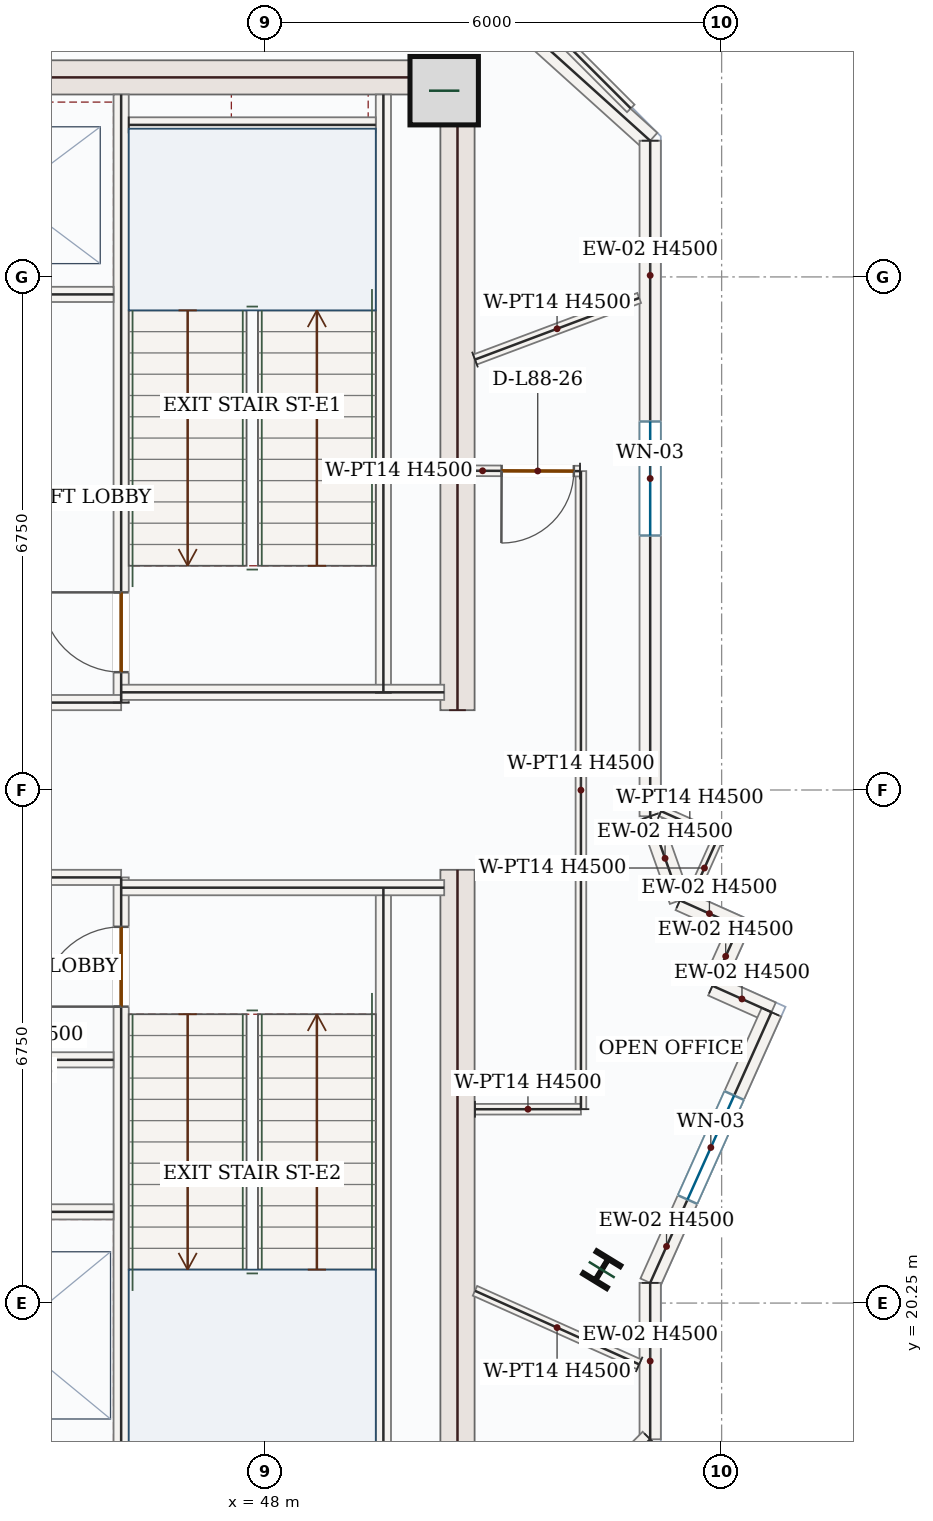
"""IFC4 building model, lengths in metres.
Left out: names, types, materials, properties, quantities, classifications, styles, units other than length and angle.
Written with IfcOpenShell. Run it as: python <this file> out.ifc"""

import sys

from ifc_helpers import new_model, si_unit, direction, frame, frame_2d, origin, origin_2d, place, context, subcontext, project, spatial, rectangle, i_section, extrude, source, transform, mapped, element, fill, save


model = new_model("IFC4")
c1 = context("Model", 3, precision=1e-05, world=origin(), true_north=direction((0.0, 1.0)))
c2 = subcontext(c1, "Body", "Model", "MODEL_VIEW")
j1 = project(units=[si_unit("LENGTHUNIT", "METRE"), si_unit("PLANEANGLEUNIT", "RADIAN")], contexts=[c1])
p1 = place(None, origin())
s1 = spatial("IfcSite", under=j1, at=p1, CompositionType="ELEMENT")
p2 = place(p1, origin())
s2 = spatial("IfcBuilding", under=s1, at=p2, CompositionType="ELEMENT")
p3 = place(p2, frame((0.0, 0.0, 361.05)))
s3 = spatial("IfcBuildingStorey", under=s2, at=p3, CompositionType="ELEMENT", Elevation=361.05)
m1 = source(origin(), c2, "Body", "SweptSolid", [
    extrude(rectangle(XDim=8.55, YDim=0.45, at=frame_2d((4.275, 0.0))), origin(), (0.0, 0.0, 1.0), 4.5),
])
for number, where, z_axis, x_axis in (
    (1, (50.525, 17.4, 0.0), (0.0, 0.0, 1.0), (0.0, 1.0, 0.0)),
    (2, (50.525, 28.05, 0.0), (0.0, 0.0, 1.0), (0.0, 1.0, 0.0)),
):
    element("IfcWall", number, at=place(p3, frame(where, z_axis=z_axis, x_axis=x_axis)), inside=s3, PredefinedType="SHEAR", context=c2, shape_type="MappedRepresentation", body=[
        mapped(m1, transform((0.0, 0.0, 0.0), x_axis=(1.0, 0.0, 0.0), y_axis=(0.0, 1.0, 0.0), z_axis=(0.0, 0.0, 1.0), scale=1.0)),
    ])
m2 = source(origin(), c2, "Body", "SweptSolid", [
    extrude(rectangle(XDim=7.1, YDim=0.45, at=frame_2d((3.55, 0.0))), origin(), (0.0, 0.0, 1.0), 4.5),
])
p4 = place(p3, frame((43.2, 36.375, 0.0), z_axis=(0.0, 0.0, 1.0), x_axis=(1.0, 0.0, 0.0)))
e3 = element("IfcWall", 3, at=p4, inside=s3, PredefinedType="SHEAR", context=c2, shape_type="MappedRepresentation", body=[
    mapped(m2, transform((0.0, 0.0, 0.0), x_axis=(1.0, 0.0, 0.0), y_axis=(0.0, 1.0, 0.0), z_axis=(0.0, 0.0, 1.0), scale=1.0)),
])
m3 = source(origin(), c2, "Body", "SweptSolid", [
    extrude(rectangle(XDim=0.9, YDim=0.9, at=origin_2d()), origin(), (0.0, 0.0, 1.0), 4.8),
])
p5 = place(p3, frame((50.35, 36.2, 0.0), z_axis=(0.0, 0.0, 1.0), x_axis=(1.0, 0.0, 0.0)))
e4 = element("IfcColumn", 4, at=p5, inside=s3, PredefinedType="COLUMN", context=c2, shape_type="MappedRepresentation", body=[
    mapped(m3, transform((0.0, 0.0, 0.0), x_axis=(1.0, 0.0, 0.0), y_axis=(0.0, 1.0, 0.0), z_axis=(0.0, 0.0, 1.0), scale=1.0)),
])
m4 = source(origin(), c2, "Body", "SweptSolid", [
    extrude(i_section(OverallWidth=0.369, OverallDepth=0.356, WebThickness=0.011, FlangeThickness=0.018, FilletRadius=0.018, at=origin_2d()), origin(), (0.0, 0.0, 1.0), 4.8),
])
p6 = place(p3, frame((52.423, 20.689, 0.0), z_axis=(0.0, 0.0, 1.0), x_axis=(-0.852640164354, 0.522498564716, 0.0)))
e5 = element("IfcColumn", 5, at=p6, inside=s3, PredefinedType="COLUMN", context=c2, shape_type="MappedRepresentation", body=[
    mapped(m4, transform((0.0, 0.0, 0.0), x_axis=(1.0, 0.0, 0.0), y_axis=(0.0, 1.0, 0.0), z_axis=(0.0, 0.0, 1.0), scale=1.0)),
])
m5 = source(origin(), c2, "Body", "SweptSolid", [
    extrude(rectangle(XDim=5.692, YDim=0.28, at=frame_2d((2.846, 0.0))), origin(), (0.0, 0.0, 1.0), 4.5),
])
p7 = place(p3, frame((48.832, 39.353, 0.0), z_axis=(0.0, 0.0, 1.0), x_axis=(0.742767121681, -0.669549850981, 0.0)))
e6 = element("IfcWall", 6, at=p7, inside=s3, PredefinedType="SOLIDWALL", context=c2, shape_type="MappedRepresentation", body=[
    mapped(m5, transform((0.0, 0.0, 0.0), x_axis=(1.0, 0.0, 0.0), y_axis=(0.0, 1.0, 0.0), z_axis=(0.0, 0.0, 1.0), scale=1.0)),
])
p8 = place(p3, frame((53.06, 35.542, 0.0), z_axis=(0.0, 0.0, 1.0), x_axis=(0.0, -1.0, 0.0)))
e7 = element("IfcWall", 7, at=p8, inside=s3, PredefinedType="SOLIDWALL", context=c2, shape_type="SweptSolid", body=[
    extrude(rectangle(XDim=8.887, YDim=0.28, at=frame_2d((4.444, 0.0))), origin(), (0.0, 0.0, 1.0), 4.5),
])
p9 = place(p8, frame((3.694, 0.0, 0.85)))
e8 = element("IfcOpeningElement", 8, at=p9, cuts=e7, PredefinedType="OPENING", context=c2, shape_type="SweptSolid", body=[
    extrude(rectangle(XDim=1.5, YDim=1.5, at=frame_2d((0.75, 0.75))), frame((0.0, 0.15, 0.0), z_axis=(0.0, -1.0, 0.0), x_axis=(1.0, 0.0, 0.0)), (0.0, 0.0, 1.0), 0.3),
])
m6 = source(origin(), c2, "Body", "SweptSolid", [
    extrude(rectangle(XDim=1.174, YDim=0.28, at=frame_2d((0.587, 0.0))), origin(), (0.0, 0.0, 1.0), 4.5),
])
p10 = place(p3, frame((53.06, 26.655, 0.0), z_axis=(0.0, 0.0, 1.0), x_axis=(0.333581493928, -0.942721266817, 0.0)))
e9 = element("IfcWall", 9, at=p10, inside=s3, PredefinedType="SOLIDWALL", context=c2, shape_type="MappedRepresentation", body=[
    mapped(m6, transform((0.0, 0.0, 0.0), x_axis=(1.0, 0.0, 0.0), y_axis=(0.0, 1.0, 0.0), z_axis=(0.0, 0.0, 1.0), scale=1.0)),
])
m7 = source(origin(), c2, "Body", "SweptSolid", [
    extrude(rectangle(XDim=0.85, YDim=0.28, at=frame_2d((0.425, 0.0))), origin(), (0.0, 0.0, 1.0), 4.5),
])
p11 = place(p3, frame((53.452, 25.548, 0.0), z_axis=(0.0, 0.0, 1.0), x_axis=(0.912527808644, -0.409014667771, 0.0)))
e10 = element("IfcWall", 10, at=p11, inside=s3, PredefinedType="SOLIDWALL", context=c2, shape_type="MappedRepresentation", body=[
    mapped(m7, transform((0.0, 0.0, 0.0), x_axis=(1.0, 0.0, 0.0), y_axis=(0.0, 1.0, 0.0), z_axis=(0.0, 0.0, 1.0), scale=1.0)),
])
m8 = source(origin(), c2, "Body", "SweptSolid", [
    extrude(rectangle(XDim=0.85, YDim=0.28, at=frame_2d((0.425, 0.0))), origin(), (0.0, 0.0, 1.0), 4.5),
])
for number, where, z_axis, x_axis in (
    (11, (54.227, 25.2, 0.0), (0.0, 0.0, 1.0), (-0.409, -0.913, 0.0)),
    (12, (53.88, 24.425, 0.0), (0.0, 0.0, 1.0), (0.913, -0.409, 0.0)),
):
    element("IfcWall", number, at=place(p3, frame(where, z_axis=z_axis, x_axis=x_axis)), inside=s3, PredefinedType="SOLIDWALL", context=c2, shape_type="MappedRepresentation", body=[
        mapped(m8, transform((0.0, 0.0, 0.0), x_axis=(1.0, 0.0, 0.0), y_axis=(0.0, 1.0, 0.0), z_axis=(0.0, 0.0, 1.0), scale=1.0)),
    ])
p12 = place(p3, frame((54.656, 24.077, 0.0), z_axis=(0.0, 0.0, 1.0), x_axis=(-0.408847516138, -0.912602711232, 0.0)))
e13 = element("IfcWall", 13, at=p12, inside=s3, PredefinedType="SOLIDWALL", context=c2, shape_type="SweptSolid", body=[
    extrude(rectangle(XDim=3.902, YDim=0.28, at=frame_2d((1.951, 0.0))), origin(), (0.0, 0.0, 1.0), 4.5),
])
p13 = place(p12, frame((1.201, 0.0, 0.85)))
e14 = element("IfcOpeningElement", 14, at=p13, cuts=e13, PredefinedType="OPENING", context=c2, shape_type="SweptSolid", body=[
    extrude(rectangle(XDim=1.5, YDim=1.5, at=frame_2d((0.75, 0.75))), frame((0.0, 0.15, 0.0), z_axis=(0.0, -1.0, 0.0), x_axis=(1.0, 0.0, 0.0)), (0.0, 0.0, 1.0), 0.3),
])
m9 = source(origin(), c2, "Body", "SweptSolid", [
    extrude(rectangle(XDim=2.058, YDim=0.28, at=frame_2d((1.029, 0.0))), origin(), (0.0, 0.0, 1.0), 4.5),
])
p14 = place(p3, frame((53.06, 20.516, 0.0), z_axis=(0.0, 0.0, 1.0), x_axis=(0.0, -1.0, 0.0)))
e15 = element("IfcWall", 15, at=p14, inside=s3, PredefinedType="SOLIDWALL", context=c2, shape_type="MappedRepresentation", body=[
    mapped(m9, transform((0.0, 0.0, 0.0), x_axis=(1.0, 0.0, 0.0), y_axis=(0.0, 1.0, 0.0), z_axis=(0.0, 0.0, 1.0), scale=1.0)),
])
m10 = source(origin(), c2, "Body", "SweptSolid", [
    extrude(rectangle(XDim=2.362, YDim=0.28, at=frame_2d((1.181, 0.0))), origin(), (0.0, 0.0, 1.0), 4.5),
])
p15 = place(p3, frame((53.06, 18.458, 0.0), z_axis=(0.0, 0.0, 1.0), x_axis=(-0.707106781187, -0.707106781187, 0.0)))
e16 = element("IfcWall", 16, at=p15, inside=s3, PredefinedType="SOLIDWALL", context=c2, shape_type="MappedRepresentation", body=[
    mapped(m10, transform((0.0, 0.0, 0.0), x_axis=(1.0, 0.0, 0.0), y_axis=(0.0, 1.0, 0.0), z_axis=(0.0, 0.0, 1.0), scale=1.0)),
])
m11 = source(origin(), c2, "Body", "SweptSolid", [
    extrude(rectangle(XDim=7.87, YDim=0.2, at=frame_2d((3.935, 0.0))), origin(), (0.0, 0.0, 1.0), 4.5),
])
for number, where, z_axis, x_axis in (
    (17, (49.55, 17.85, 0.0), (0.0, 0.0, 1.0), (0.0, 1.0, 0.0)),
    (18, (49.55, 28.28, 0.0), (0.0, 0.0, 1.0), (0.0, 1.0, 0.0)),
):
    element("IfcWall", number, at=place(p3, frame(where, z_axis=z_axis, x_axis=x_axis)), inside=s3, PredefinedType="SOLIDWALL", context=c2, shape_type="MappedRepresentation", body=[
        mapped(m11, transform((0.0, 0.0, 0.0), x_axis=(1.0, 0.0, 0.0), y_axis=(0.0, 1.0, 0.0), z_axis=(0.0, 0.0, 1.0), scale=1.0)),
    ])
p16 = place(p3, frame((46.1, 17.85, 0.0), z_axis=(0.0, 0.0, 1.0), x_axis=(0.0, 1.0, 0.0)))
e19 = element("IfcWall", 19, at=p16, inside=s3, PredefinedType="SOLIDWALL", context=c2, shape_type="SweptSolid", body=[
    extrude(rectangle(XDim=8.0, YDim=0.2, at=frame_2d((4.0, 0.0))), origin(), (0.0, 0.0, 1.0), 4.5),
])
p17 = place(p16, frame((6.3, 0.0, 0.0)))
e20 = element("IfcOpeningElement", 20, at=p17, cuts=e19, PredefinedType="OPENING", context=c2, shape_type="SweptSolid", body=[
    extrude(rectangle(XDim=1.05, YDim=2.15, at=frame_2d((0.525, 1.075))), frame((0.0, 0.11, 0.0), z_axis=(0.0, -1.0, 0.0), x_axis=(1.0, 0.0, 0.0)), (0.0, 0.0, 1.0), 0.22),
])
p18 = place(p3, frame((46.1, 28.15, 0.0), z_axis=(0.0, 0.0, 1.0), x_axis=(0.0, 1.0, 0.0)))
e21 = element("IfcWall", 21, at=p18, inside=s3, PredefinedType="SOLIDWALL", context=c2, shape_type="SweptSolid", body=[
    extrude(rectangle(XDim=8.0, YDim=0.2, at=frame_2d((4.0, 0.0))), origin(), (0.0, 0.0, 1.0), 4.5),
])
p19 = place(p18, frame((0.4, 0.0, 0.0)))
e22 = element("IfcOpeningElement", 22, at=p19, cuts=e21, PredefinedType="OPENING", context=c2, shape_type="SweptSolid", body=[
    extrude(rectangle(XDim=1.05, YDim=2.15, at=frame_2d((0.525, 1.075))), frame((0.0, 0.11, 0.0), z_axis=(0.0, -1.0, 0.0), x_axis=(1.0, 0.0, 0.0)), (0.0, 0.0, 1.0), 0.22),
])
m12 = source(origin(), c2, "Body", "SweptSolid", [
    extrude(rectangle(XDim=3.0, YDim=0.2, at=frame_2d((1.5, 0.0))), origin(), (0.0, 0.0, 1.0), 4.5),
])
p20 = place(p3, frame((43.1, 25.85, 0.0), z_axis=(0.0, 0.0, 1.0), x_axis=(1.0, 0.0, 0.0)))
e23 = element("IfcWall", 23, at=p20, inside=s3, PredefinedType="SOLIDWALL", context=c2, shape_type="MappedRepresentation", body=[
    mapped(m12, transform((0.0, 0.0, 0.0), x_axis=(1.0, 0.0, 0.0), y_axis=(0.0, 1.0, 0.0), z_axis=(0.0, 0.0, 1.0), scale=1.0)),
])
m13 = source(origin(), c2, "Body", "SweptSolid", [
    extrude(rectangle(XDim=4.25, YDim=0.2, at=frame_2d((2.125, 0.0))), origin(), (0.0, 0.0, 1.0), 4.5),
])
p21 = place(p3, frame((46.1, 25.715, 0.0), z_axis=(0.0, 0.0, 1.0), x_axis=(1.0, 0.0, 0.0)))
e24 = element("IfcWall", 24, at=p21, inside=s3, PredefinedType="SOLIDWALL", context=c2, shape_type="MappedRepresentation", body=[
    mapped(m13, transform((0.0, 0.0, 0.0), x_axis=(1.0, 0.0, 0.0), y_axis=(0.0, 1.0, 0.0), z_axis=(0.0, 0.0, 1.0), scale=1.0)),
])
p22 = place(p3, frame((43.1, 28.15, 0.0), z_axis=(0.0, 0.0, 1.0), x_axis=(1.0, 0.0, 0.0)))
e25 = element("IfcWall", 25, at=p22, inside=s3, PredefinedType="SOLIDWALL", context=c2, shape_type="MappedRepresentation", body=[
    mapped(m12, transform((0.0, 0.0, 0.0), x_axis=(1.0, 0.0, 0.0), y_axis=(0.0, 1.0, 0.0), z_axis=(0.0, 0.0, 1.0), scale=1.0)),
])
p23 = place(p3, frame((46.1, 28.285, 0.0), z_axis=(0.0, 0.0, 1.0), x_axis=(1.0, 0.0, 0.0)))
e26 = element("IfcWall", 26, at=p23, inside=s3, PredefinedType="SOLIDWALL", context=c2, shape_type="MappedRepresentation", body=[
    mapped(m13, transform((0.0, 0.0, 0.0), x_axis=(1.0, 0.0, 0.0), y_axis=(0.0, 1.0, 0.0), z_axis=(0.0, 0.0, 1.0), scale=1.0)),
])
m14 = source(origin(), c2, "Body", "SweptSolid", [
    extrude(rectangle(XDim=3.25, YDim=0.2, at=frame_2d((1.625, 0.0))), origin(), (0.0, 0.0, 1.0), 4.5),
])
p24 = place(p3, frame((46.2, 35.75, 0.0), z_axis=(0.0, 0.0, 1.0), x_axis=(1.0, 0.0, 0.0)))
e27 = element("IfcWall", 27, at=p24, inside=s3, PredefinedType="SOLIDWALL", context=c2, shape_type="MappedRepresentation", body=[
    mapped(m14, transform((0.0, 0.0, 0.0), x_axis=(1.0, 0.0, 0.0), y_axis=(0.0, 1.0, 0.0), z_axis=(0.0, 0.0, 1.0), scale=1.0)),
])
p25 = place(p3, frame((43.25, 33.52, 0.0), z_axis=(0.0, 0.0, 1.0), x_axis=(1.0, 0.0, 0.0)))
e28 = element("IfcWall", 28, at=p25, inside=s3, PredefinedType="SOLIDWALL", context=c2, shape_type="SweptSolid", body=[
    extrude(rectangle(XDim=2.75, YDim=0.2, at=frame_2d((1.375, 0.0))), origin(), (0.0, 0.0, 1.0), 4.5),
])
p26 = place(p25, frame((0.82, 0.0, 0.0)))
e29 = element("IfcOpeningElement", 29, at=p26, cuts=e28, PredefinedType="OPENING", context=c2, shape_type="SweptSolid", body=[
    extrude(rectangle(XDim=1.1, YDim=2.15, at=frame_2d((0.55, 1.075))), frame((0.0, 0.11, 0.0), z_axis=(0.0, -1.0, 0.0), x_axis=(1.0, 0.0, 0.0)), (0.0, 0.0, 1.0), 0.22),
])
m15 = source(origin(), c2, "Body", "SweptSolid", [
    extrude(rectangle(XDim=2.75, YDim=0.2, at=frame_2d((1.375, 0.0))), origin(), (0.0, 0.0, 1.0), 4.5),
])
for number, where, z_axis, x_axis in (
    (30, (43.25, 23.45, 0.0), (0.0, 0.0, 1.0), (1.0, 0.0, 0.0)),
    (31, (43.25, 21.45, 0.0), (0.0, 0.0, 1.0), (1.0, 0.0, 0.0)),
):
    element("IfcWall", number, at=place(p3, frame(where, z_axis=z_axis, x_axis=x_axis)), inside=s3, PredefinedType="SOLIDWALL", context=c2, shape_type="MappedRepresentation", body=[
        mapped(m15, transform((0.0, 0.0, 0.0), x_axis=(1.0, 0.0, 0.0), y_axis=(0.0, 1.0, 0.0), z_axis=(0.0, 0.0, 1.0), scale=1.0)),
    ])
m16 = source(origin(), c2, "Body", "SweptSolid", [
    extrude(rectangle(XDim=8.394, YDim=0.14, at=frame_2d((4.197, 0.0))), origin(), (0.0, 0.0, 1.0), 4.5),
])
p27 = place(p3, frame((52.149, 22.801, 0.0), z_axis=(0.0, 0.0, 1.0), x_axis=(-2.908414e-05, 0.999999999577, 0.0)))
e32 = element("IfcWall", 32, at=p27, inside=s3, PredefinedType="PARTITIONING", context=c2, shape_type="MappedRepresentation", body=[
    mapped(m16, transform((0.0, 0.0, 0.0), x_axis=(1.0, 0.0, 0.0), y_axis=(0.0, 1.0, 0.0), z_axis=(0.0, 0.0, 1.0), scale=1.0)),
])
p28 = place(p3, frame((52.137, 31.195, 0.0), z_axis=(0.0, 0.0, 1.0), x_axis=(-0.999994943164, 0.003180195932, 0.0)))
e33 = element("IfcWall", 33, at=p28, inside=s3, PredefinedType="PARTITIONING", context=c2, shape_type="SweptSolid", body=[
    extrude(rectangle(XDim=1.382, YDim=0.14, at=frame_2d((0.691, 0.0))), origin(), (0.0, 0.0, 1.0), 4.5),
])
p29 = place(p28, frame((0.081, 0.0, 0.0)))
e34 = element("IfcOpeningElement", 34, at=p29, cuts=e33, PredefinedType="OPENING", context=c2, shape_type="SweptSolid", body=[
    extrude(rectangle(XDim=0.95, YDim=2.15, at=frame_2d((0.475, 1.075))), frame((0.0, 0.08, 0.0), z_axis=(0.0, -1.0, 0.0), x_axis=(1.0, 0.0, 0.0)), (0.0, 0.0, 1.0), 0.16),
])
m17 = source(origin(), c2, "Body", "SweptSolid", [
    extrude(rectangle(XDim=2.307, YDim=0.14, at=frame_2d((1.154, 0.0))), origin(), (0.0, 0.0, 1.0), 4.5),
])
p30 = place(p3, frame((50.755, 32.663, 0.0), z_axis=(0.0, 0.0, 1.0), x_axis=(0.936329177569, 0.351123441588, 0.0)))
e35 = element("IfcWall", 35, at=p30, inside=s3, PredefinedType="PARTITIONING", context=c2, shape_type="MappedRepresentation", body=[
    mapped(m17, transform((0.0, 0.0, 0.0), x_axis=(1.0, 0.0, 0.0), y_axis=(0.0, 1.0, 0.0), z_axis=(0.0, 0.0, 1.0), scale=1.0)),
])
m18 = source(origin(), c2, "Body", "SweptSolid", [
    extrude(rectangle(XDim=0.825, YDim=0.14, at=frame_2d((0.413, 0.0))), origin(), (0.0, 0.0, 1.0), 4.5),
])
p31 = place(p3, frame((53.205, 26.721, 0.0), z_axis=(0.0, 0.0, 1.0), x_axis=(0.912513134147, -0.409047405576, 0.0)))
e36 = element("IfcWall", 36, at=p31, inside=s3, PredefinedType="PARTITIONING", context=c2, shape_type="MappedRepresentation", body=[
    mapped(m18, transform((0.0, 0.0, 0.0), x_axis=(1.0, 0.0, 0.0), y_axis=(0.0, 1.0, 0.0), z_axis=(0.0, 0.0, 1.0), scale=1.0)),
])
m19 = source(origin(), c2, "Body", "SweptSolid", [
    extrude(rectangle(XDim=0.749, YDim=0.14, at=frame_2d((0.375, 0.0))), origin(), (0.0, 0.0, 1.0), 4.5),
])
p32 = place(p3, frame((53.927, 26.315, 0.0), z_axis=(0.0, 0.0, 1.0), x_axis=(-0.408737677389, -0.912651911236, 0.0)))
e37 = element("IfcWall", 37, at=p32, inside=s3, PredefinedType="PARTITIONING", context=c2, shape_type="MappedRepresentation", body=[
    mapped(m19, transform((0.0, 0.0, 0.0), x_axis=(1.0, 0.0, 0.0), y_axis=(0.0, 1.0, 0.0), z_axis=(0.0, 0.0, 1.0), scale=1.0)),
])
m20 = source(origin(), c2, "Body", "SweptSolid", [
    extrude(rectangle(XDim=2.367, YDim=0.14, at=frame_2d((1.184, 0.0))), origin(), (0.0, 0.0, 1.0), 4.5),
])
p33 = place(p3, frame((52.915, 19.444, 0.0), z_axis=(0.0, 0.0, 1.0), x_axis=(-0.912599576991, 0.408854512115, 0.0)))
e38 = element("IfcWall", 38, at=p33, inside=s3, PredefinedType="PARTITIONING", context=c2, shape_type="MappedRepresentation", body=[
    mapped(m20, transform((0.0, 0.0, 0.0), x_axis=(1.0, 0.0, 0.0), y_axis=(0.0, 1.0, 0.0), z_axis=(0.0, 0.0, 1.0), scale=1.0)),
])
m21 = source(origin(), c2, "Body", "SweptSolid", [
    extrude(rectangle(XDim=1.394, YDim=0.14, at=frame_2d((0.697, 0.0))), origin(), (0.0, 0.0, 1.0), 4.5),
])
p34 = place(p3, frame((50.755, 22.8, 0.0), z_axis=(0.0, 0.0, 1.0), x_axis=(0.999999754632, 0.000700525222, 0.0)))
e39 = element("IfcWall", 39, at=p34, inside=s3, PredefinedType="PARTITIONING", context=c2, shape_type="MappedRepresentation", body=[
    mapped(m21, transform((0.0, 0.0, 0.0), x_axis=(1.0, 0.0, 0.0), y_axis=(0.0, 1.0, 0.0), z_axis=(0.0, 0.0, 1.0), scale=1.0)),
])
m22 = source(origin(), c2, "Body", "SweptSolid", [
    extrude(rectangle(XDim=4.826, YDim=0.14, at=frame_2d((2.413, 0.0))), origin(), (0.0, 0.0, 1.0), 4.5),
])
p35 = place(p3, frame((49.392, 39.38, 0.0), z_axis=(0.0, 0.0, 1.0), x_axis=(0.707081488078, -0.70713207339, 0.0)))
e40 = element("IfcWall", 40, at=p35, inside=s3, PredefinedType="PARTITIONING", context=c2, shape_type="MappedRepresentation", body=[
    mapped(m22, transform((0.0, 0.0, 0.0), x_axis=(1.0, 0.0, 0.0), y_axis=(0.0, 1.0, 0.0), z_axis=(0.0, 0.0, 1.0), scale=1.0)),
])
m23 = source(origin(), c2, "Body", "SweptSolid", [
    extrude(rectangle(XDim=1.5, YDim=1.5, at=frame_2d((0.75, 0.75))), frame((0.0, 0.03, 0.0), z_axis=(0.0, -1.0, 0.0), x_axis=(1.0, 0.0, 0.0)), (0.0, 0.0, 1.0), 0.06),
])
p36 = place(p9, origin())
e41 = element("IfcWindow", 41, at=p36, inside=s3, PartitioningType="SINGLE_PANEL", PredefinedType="WINDOW", context=c2, shape_type="MappedRepresentation", body=[
    mapped(m23, transform((0.0, 0.0, 0.0), x_axis=(1.0, 0.0, 0.0), y_axis=(0.0, 1.0, 0.0), z_axis=(0.0, 0.0, 1.0), scale=1.0)),
])
fill(e8, e41)
p37 = place(p13, origin())
e42 = element("IfcWindow", 42, at=p37, inside=s3, PartitioningType="SINGLE_PANEL", PredefinedType="WINDOW", context=c2, shape_type="MappedRepresentation", body=[
    mapped(m23, transform((0.0, 0.0, 0.0), x_axis=(1.0, 0.0, 0.0), y_axis=(0.0, 1.0, 0.0), z_axis=(0.0, 0.0, 1.0), scale=1.0)),
])
fill(e14, e42)
m24 = source(origin(), c2, "Body", "SweptSolid", [
    extrude(rectangle(XDim=1.05, YDim=2.15, at=frame_2d((0.525, 1.075))), frame((0.0, 0.025, 0.0), z_axis=(0.0, -1.0, 0.0), x_axis=(1.0, 0.0, 0.0)), (0.0, 0.0, 1.0), 0.05),
])
p38 = place(p19, origin())
e43 = element("IfcDoor", 43, at=p38, inside=s3, OperationType="SINGLE_SWING_RIGHT", PredefinedType="DOOR", context=c2, shape_type="MappedRepresentation", body=[
    mapped(m24, transform((0.0, 0.0, 0.0), x_axis=(1.0, 0.0, 0.0), y_axis=(0.0, 1.0, 0.0), z_axis=(0.0, 0.0, 1.0), scale=1.0)),
])
fill(e22, e43)
p39 = place(p17, origin())
e44 = element("IfcDoor", 44, at=p39, inside=s3, OperationType="SINGLE_SWING_LEFT", PredefinedType="DOOR", context=c2, shape_type="MappedRepresentation", body=[
    mapped(m24, transform((0.0, 0.0, 0.0), x_axis=(1.0, 0.0, 0.0), y_axis=(0.0, 1.0, 0.0), z_axis=(0.0, 0.0, 1.0), scale=1.0)),
])
fill(e20, e44)
m25 = source(origin(), c2, "Body", "SweptSolid", [
    extrude(rectangle(XDim=0.95, YDim=2.15, at=frame_2d((0.475, 1.075))), frame((0.0, 0.025, 0.0), z_axis=(0.0, -1.0, 0.0), x_axis=(1.0, 0.0, 0.0)), (0.0, 0.0, 1.0), 0.05),
])
p40 = place(p29, origin())
e45 = element("IfcDoor", 45, at=p40, inside=s3, OperationType="SINGLE_SWING_RIGHT", PredefinedType="DOOR", context=c2, shape_type="MappedRepresentation", body=[
    mapped(m25, transform((0.0, 0.0, 0.0), x_axis=(1.0, 0.0, 0.0), y_axis=(0.0, 1.0, 0.0), z_axis=(0.0, 0.0, 1.0), scale=1.0)),
])
fill(e34, e45)
save(model, sys.argv[1])
